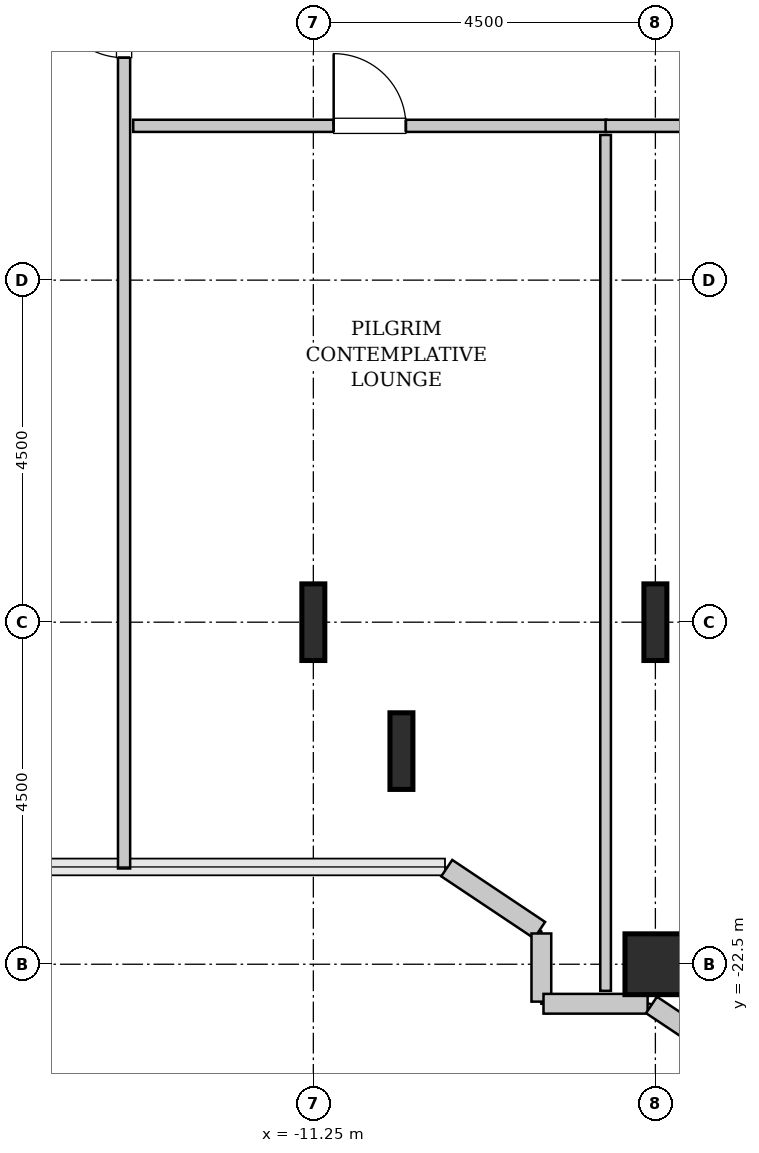
"""IFC4 building model, lengths in metres.
Left out: names, types, materials, properties, quantities, classifications, styles, units other than length and angle.
Written with IfcOpenShell. Run it as: python <this file> out.ifc"""

import sys

from ifc_helpers import new_model, si_unit, direction, frame, frame_2d, origin, origin_2d, place, context, subcontext, project, spatial, rectangle, hollow_rectangle, i_section, extrude, source, transform, mapped, element, fill, save


model = new_model("IFC4")
c1 = context("Model", 3, precision=1e-05, world=origin(), true_north=direction((0.0, 1.0)))
c2 = subcontext(c1, "Body", "Model", "MODEL_VIEW")
j1 = project(units=[si_unit("LENGTHUNIT", "METRE"), si_unit("PLANEANGLEUNIT", "RADIAN")], contexts=[c1])
p1 = place(None, origin())
s1 = spatial("IfcSite", under=j1, at=p1, CompositionType="ELEMENT")
p2 = place(p1, origin())
s2 = spatial("IfcBuilding", under=s1, at=p2, CompositionType="ELEMENT")
p3 = place(p2, frame((0.0, 0.0, 128.8)))
s3 = spatial("IfcBuildingStorey", under=s2, at=p3, CompositionType="ELEMENT", Elevation=128.8)
m1 = source(origin(), c2, "Body", "SweptSolid", [
    extrude(i_section(OverallWidth=0.302, OverallDepth=1.008, WebThickness=0.021, FlangeThickness=0.04, FilletRadius=0.03, at=origin_2d()), origin(), (0.0, 0.0, 1.0), 3.8),
])
for number, where, z_axis, x_axis in (
    (1, (-11.25, -18.0, 0.0), (0.0, 0.0, 1.0), (1.0, 0.0, 0.0)),
    (2, (-10.091, -19.696, 0.0), (0.0, 0.0, 1.0), (1.0, 0.0, 0.0)),
):
    element("IfcColumn", number, at=place(p3, frame(where, z_axis=z_axis, x_axis=x_axis)), inside=s3, PredefinedType="COLUMN", context=c2, shape_type="MappedRepresentation", body=[
        mapped(m1, transform((0.0, 0.0, 0.0), x_axis=(1.0, 0.0, 0.0), y_axis=(0.0, 1.0, 0.0), z_axis=(0.0, 0.0, 1.0), scale=1.0)),
    ])
m2 = source(origin(), c2, "Body", "SweptSolid", [
    extrude(hollow_rectangle(XDim=0.8, YDim=0.8, WallThickness=0.04, InnerFilletRadius=0.04, OuterFilletRadius=0.08, at=origin_2d()), origin(), (0.0, 0.0, 1.0), 3.8),
])
p4 = place(p3, frame((-6.75, -22.5, 0.0), z_axis=(0.0, 0.0, 1.0), x_axis=(1.0, 0.0, 0.0)))
e3 = element("IfcColumn", 3, at=p4, inside=s3, PredefinedType="COLUMN", context=c2, shape_type="MappedRepresentation", body=[
    mapped(m2, transform((0.0, 0.0, 0.0), x_axis=(1.0, 0.0, 0.0), y_axis=(0.0, 1.0, 0.0), z_axis=(0.0, 0.0, 1.0), scale=1.0)),
])
p5 = place(p3, frame((-6.75, -18.0, 0.0), z_axis=(0.0, 0.0, 1.0), x_axis=(1.0, 0.0, 0.0)))
e4 = element("IfcColumn", 4, at=p5, inside=s3, PredefinedType="COLUMN", context=c2, shape_type="MappedRepresentation", body=[
    mapped(m1, transform((0.0, 0.0, 0.0), x_axis=(1.0, 0.0, 0.0), y_axis=(0.0, 1.0, 0.0), z_axis=(0.0, 0.0, 1.0), scale=1.0)),
])
m3 = source(origin(), c2, "Body", "SweptSolid", [
    extrude(rectangle(XDim=1.469, YDim=0.26, at=frame_2d((0.734, 0.0))), origin(), (0.0, 0.0, 1.0), 3.55),
])
p6 = place(p3, frame((-9.495, -21.236, 0.0), z_axis=(0.0, 0.0, 1.0), x_axis=(0.831461760506, -0.555581983884, 0.0)))
e5 = element("IfcWall", 5, at=p6, inside=s3, PredefinedType="SOLIDWALL", context=c2, shape_type="MappedRepresentation", body=[
    mapped(m3, transform((0.0, 0.0, 0.0), x_axis=(1.0, 0.0, 0.0), y_axis=(0.0, 1.0, 0.0), z_axis=(0.0, 0.0, 1.0), scale=1.0)),
])
m4 = source(origin(), c2, "Body", "SweptSolid", [
    extrude(rectangle(XDim=0.897, YDim=0.26, at=frame_2d((0.448, 0.0))), origin(), (0.0, 0.0, 1.0), 3.55),
])
p7 = place(p3, frame((-8.25, -22.095, 0.0), z_axis=(0.0, 0.0, 1.0), x_axis=(0.0, -1.0, 0.0)))
e6 = element("IfcWall", 6, at=p7, inside=s3, PredefinedType="SOLIDWALL", context=c2, shape_type="MappedRepresentation", body=[
    mapped(m4, transform((0.0, 0.0, 0.0), x_axis=(1.0, 0.0, 0.0), y_axis=(0.0, 1.0, 0.0), z_axis=(0.0, 0.0, 1.0), scale=1.0)),
])
m5 = source(origin(), c2, "Body", "SweptSolid", [
    extrude(rectangle(XDim=1.37, YDim=0.26, at=frame_2d((0.685, 0.0))), origin(), (0.0, 0.0, 1.0), 3.55),
])
p8 = place(p3, frame((-8.222, -23.02, 0.0), z_axis=(0.0, 0.0, 1.0), x_axis=(1.0, 0.0, 0.0)))
e7 = element("IfcWall", 7, at=p8, inside=s3, PredefinedType="SOLIDWALL", context=c2, shape_type="MappedRepresentation", body=[
    mapped(m5, transform((0.0, 0.0, 0.0), x_axis=(1.0, 0.0, 0.0), y_axis=(0.0, 1.0, 0.0), z_axis=(0.0, 0.0, 1.0), scale=1.0)),
])
m6 = source(origin(), c2, "Body", "SweptSolid", [
    extrude(rectangle(XDim=0.565, YDim=0.26, at=frame_2d((0.283, 0.0))), origin(), (0.0, 0.0, 1.0), 3.55),
])
p9 = place(p3, frame((-6.801, -23.036, 0.0), z_axis=(0.0, 0.0, 1.0), x_axis=(0.831651492666, -0.555297933317, 0.0)))
e8 = element("IfcWall", 8, at=p9, inside=s3, PredefinedType="SOLIDWALL", context=c2, shape_type="MappedRepresentation", body=[
    mapped(m6, transform((0.0, 0.0, 0.0), x_axis=(1.0, 0.0, 0.0), y_axis=(0.0, 1.0, 0.0), z_axis=(0.0, 0.0, 1.0), scale=1.0)),
])
m7 = source(origin(), c2, "Body", "SweptSolid", [
    extrude(rectangle(XDim=12.552, YDim=0.16, at=frame_2d((6.276, 0.0))), origin(), (0.0, 0.0, 1.0), 3.535),
])
p10 = place(p3, frame((-13.74, -21.24, 0.0), z_axis=(0.0, 0.0, 1.0), x_axis=(0.0, 1.0, 0.0)))
e9 = element("IfcWall", 9, at=p10, inside=s3, PredefinedType="PARTITIONING", context=c2, shape_type="MappedRepresentation", body=[
    mapped(m7, transform((0.0, 0.0, 0.0), x_axis=(1.0, 0.0, 0.0), y_axis=(0.0, 1.0, 0.0), z_axis=(0.0, 0.0, 1.0), scale=1.0)),
])
p11 = place(p10, frame((10.666, 0.0, 0.0)))
e10 = element("IfcOpeningElement", 10, at=p11, cuts=e9, PredefinedType="OPENING", context=c2, shape_type="SweptSolid", body=[
    extrude(rectangle(XDim=0.95, YDim=2.1, at=frame_2d((0.475, 1.05))), frame((0.0, 0.09, 0.0), z_axis=(0.0, -1.0, 0.0), x_axis=(1.0, 0.0, 0.0)), (0.0, 0.0, 1.0), 0.18),
])
m8 = source(origin(), c2, "Body", "SweptSolid", [
    extrude(rectangle(XDim=6.225, YDim=0.16, at=frame_2d((3.113, 0.0))), origin(), (0.0, 0.0, 1.0), 3.535),
])
p12 = place(p3, frame((-13.62, -11.47, 0.0), z_axis=(0.0, 0.0, 1.0), x_axis=(1.0, 0.0, 0.0)))
e11 = element("IfcWall", 11, at=p12, inside=s3, PredefinedType="PARTITIONING", context=c2, shape_type="MappedRepresentation", body=[
    mapped(m8, transform((0.0, 0.0, 0.0), x_axis=(1.0, 0.0, 0.0), y_axis=(0.0, 1.0, 0.0), z_axis=(0.0, 0.0, 1.0), scale=1.0)),
])
p13 = place(p12, frame((2.637, 0.0, 0.0)))
e12 = element("IfcOpeningElement", 12, at=p13, cuts=e11, PredefinedType="OPENING", context=c2, shape_type="SweptSolid", body=[
    extrude(rectangle(XDim=0.95, YDim=2.1, at=frame_2d((0.475, 1.05))), frame((0.0, 0.09, 0.0), z_axis=(0.0, -1.0, 0.0), x_axis=(1.0, 0.0, 0.0)), (0.0, 0.0, 1.0), 0.18),
])
m9 = source(origin(), c2, "Body", "SweptSolid", [
    extrude(rectangle(XDim=11.26, YDim=0.14, at=frame_2d((5.63, 0.0))), origin(), (0.0, 0.0, 1.0), 3.535),
])
p14 = place(p3, frame((-7.405, -22.85, 0.0), z_axis=(0.0, 0.0, 1.0), x_axis=(0.0, 1.0, 0.0)))
e13 = element("IfcWall", 13, at=p14, inside=s3, PredefinedType="PARTITIONING", context=c2, shape_type="MappedRepresentation", body=[
    mapped(m9, transform((0.0, 0.0, 0.0), x_axis=(1.0, 0.0, 0.0), y_axis=(0.0, 1.0, 0.0), z_axis=(0.0, 0.0, 1.0), scale=1.0)),
])
m10 = source(origin(), c2, "Body", "SweptSolid", [
    extrude(rectangle(XDim=6.105, YDim=0.16, at=frame_2d((3.052, 0.0))), origin(), (0.0, 0.0, 1.0), 3.535),
])
p15 = place(p3, frame((-7.405, -11.47, 0.0), z_axis=(0.0, 0.0, 1.0), x_axis=(1.0, 0.0, 0.0)))
e14 = element("IfcWall", 14, at=p15, inside=s3, PredefinedType="PARTITIONING", context=c2, shape_type="MappedRepresentation", body=[
    mapped(m10, transform((0.0, 0.0, 0.0), x_axis=(1.0, 0.0, 0.0), y_axis=(0.0, 1.0, 0.0), z_axis=(0.0, 0.0, 1.0), scale=1.0)),
])
p16 = place(p15, frame((2.577, 0.0, 0.0)))
e15 = element("IfcOpeningElement", 15, at=p16, cuts=e14, PredefinedType="OPENING", context=c2, shape_type="SweptSolid", body=[
    extrude(rectangle(XDim=0.95, YDim=2.1, at=frame_2d((0.475, 1.05))), frame((0.0, 0.09, 0.0), z_axis=(0.0, -1.0, 0.0), x_axis=(1.0, 0.0, 0.0)), (0.0, 0.0, 1.0), 0.18),
])
m11 = source(origin(), c2, "Body", "SweptSolid", [
    extrude(rectangle(XDim=0.95, YDim=2.1, at=frame_2d((0.475, 1.05))), frame((0.0, 0.025, 0.0), z_axis=(0.0, -1.0, 0.0), x_axis=(1.0, 0.0, 0.0)), (0.0, 0.0, 1.0), 0.05),
])
p17 = place(p11, origin())
e16 = element("IfcDoor", 16, at=p17, inside=s3, OperationType="SINGLE_SWING_RIGHT", PredefinedType="DOOR", context=c2, shape_type="MappedRepresentation", body=[
    mapped(m11, transform((0.0, 0.0, 0.0), x_axis=(1.0, 0.0, 0.0), y_axis=(0.0, 1.0, 0.0), z_axis=(0.0, 0.0, 1.0), scale=1.0)),
])
fill(e10, e16)
p18 = place(p13, origin())
e17 = element("IfcDoor", 17, at=p18, inside=s3, OperationType="SINGLE_SWING_LEFT", PredefinedType="DOOR", context=c2, shape_type="MappedRepresentation", body=[
    mapped(m11, transform((0.0, 0.0, 0.0), x_axis=(1.0, 0.0, 0.0), y_axis=(0.0, 1.0, 0.0), z_axis=(0.0, 0.0, 1.0), scale=1.0)),
])
fill(e12, e17)
save(model, sys.argv[1])
